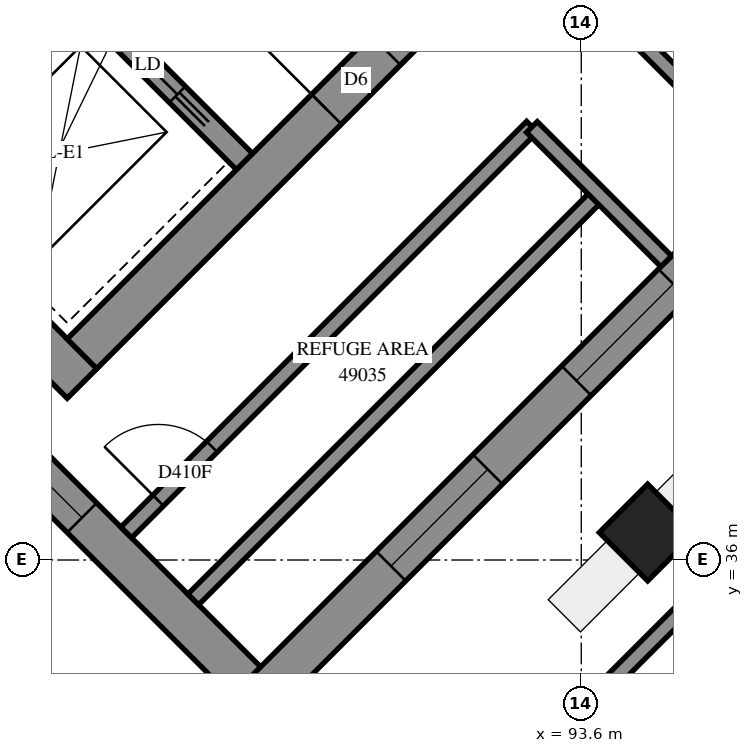
"""IFC4 building model, lengths in metres.
Left out: names, types, materials, properties, quantities, classifications, styles, units other than length and angle.
Written with IfcOpenShell. Run it as: python <this file> out.ifc"""

import sys

from ifc_helpers import new_model, si_unit, direction, frame, frame_2d, origin, origin_2d, place, context, subcontext, project, spatial, polyline, rectangle, outline, extrude, element, fill, save


model = new_model("IFC4")
c1 = context("Model", 3, precision=1e-05, world=origin(), true_north=direction((0.0, 1.0)))
c2 = subcontext(c1, "Body", "Model", "MODEL_VIEW")
j1 = project(units=[si_unit("LENGTHUNIT", "METRE"), si_unit("PLANEANGLEUNIT", "RADIAN")], contexts=[c1])
p1 = place(None, origin())
s1 = spatial("IfcSite", under=j1, at=p1, CompositionType="ELEMENT")
p2 = place(p1, origin())
s2 = spatial("IfcBuilding", under=s1, at=p2, CompositionType="ELEMENT")
p3 = place(p2, frame((0.0, 0.0, 180.4)))
s3 = spatial("IfcBuildingStorey", under=s2, at=p3, CompositionType="ELEMENT", Elevation=180.4)
p4 = place(p3, frame((94.474, 36.362, -0.3), z_axis=(0.0, 0.0, 1.0), x_axis=(0.7071067812, -0.7071067812, 0.0)))
e1 = element("IfcColumn", 1, at=p4, inside=s3, PredefinedType="COLUMN", context=c2, shape_type="SweptSolid", body=[
    extrude(rectangle(XDim=0.9, YDim=0.9, at=origin_2d()), origin(), (0.0, 0.0, 1.0), 5.0),
])
p5 = place(p3, frame((76.071, 49.284, -0.3), z_axis=(0.0, 0.0, 1.0), x_axis=(0.7071035554, -0.707110007, 0.0)))
e2 = element("IfcWall", 2, at=p5, inside=s3, PredefinedType="SHEAR", context=c2, shape_type="SweptSolid", body=[
    extrude(rectangle(XDim=15.5, YDim=0.55, at=frame_2d((7.75, 0.0))), origin(), (0.0, 0.0, 1.0), 4.3),
])
p6 = place(p3, frame((87.031, 38.713, -0.3), z_axis=(0.0, 0.0, 1.0), x_axis=(0.707103309, 0.7071102534, 0.0)))
e3 = element("IfcWall", 3, at=p6, inside=s3, PredefinedType="SHEAR", context=c2, shape_type="SweptSolid", body=[
    extrude(rectangle(XDim=14.4, YDim=0.55, at=frame_2d((7.2, 0.0))), origin(), (0.0, 0.0, 1.0), 4.3),
])
p7 = place(p6, frame((4.55, 0.0, 0.3)))
e4 = element("IfcOpeningElement", 4, at=p7, cuts=e3, PredefinedType="OPENING", context=c2, shape_type="SweptSolid", body=[
    extrude(rectangle(XDim=1.1, YDim=2.1, at=frame_2d((0.55, 1.05))), frame((0.0, 0.285, 0.0), z_axis=(0.0, -1.0, 0.0), x_axis=(1.0, 0.0, 0.0)), (0.0, 0.0, 1.0), 0.57),
])
p8 = place(p6, frame((11.35, 0.0, 0.3)))
e5 = element("IfcOpeningElement", 5, at=p8, cuts=e3, PredefinedType="OPENING", context=c2, shape_type="SweptSolid", body=[
    extrude(rectangle(XDim=1.1, YDim=2.1, at=frame_2d((0.55, 1.05))), frame((0.0, 0.285, 0.0), z_axis=(0.0, -1.0, 0.0), x_axis=(1.0, 0.0, 0.0)), (0.0, 0.0, 1.0), 0.57),
])
p9 = place(p3, frame((84.291, 41.453, 0.0), z_axis=(0.0, 0.0, 1.0), x_axis=(0.7071067812, 0.7071067812, 0.0)))
e6 = element("IfcWall", 6, at=p9, inside=s3, PredefinedType="SOLIDWALL", context=c2, shape_type="SweptSolid", body=[
    extrude(rectangle(XDim=3.3, YDim=0.3, at=frame_2d((1.65, 0.0))), origin(), (0.0, 0.0, 1.0), 4.7),
])
p10 = place(p3, frame((78.988, 51.423, 0.0), z_axis=(0.0, 0.0, 1.0), x_axis=(0.7071067812, -0.7071067812, 0.0)))
e7 = element("IfcWall", 7, at=p10, inside=s3, PredefinedType="SOLIDWALL", context=c2, shape_type="SweptSolid", body=[
    extrude(rectangle(XDim=14.4, YDim=0.3, at=frame_2d((7.2, 0.0))), origin(), (0.0, 0.0, 1.0), 4.7),
])
p11 = place(p10, frame((1.35, 0.0, 0.0)))
e8 = element("IfcOpeningElement", 8, at=p11, cuts=e7, PredefinedType="OPENING", context=c2, shape_type="SweptSolid", body=[
    extrude(rectangle(XDim=0.9, YDim=2.1, at=frame_2d((0.45, 1.05))), frame((0.0, 0.16, 0.0), z_axis=(0.0, -1.0, 0.0), x_axis=(1.0, 0.0, 0.0)), (0.0, 0.0, 1.0), 0.32),
])
p12 = place(p10, frame((4.95, 0.0, 0.0)))
e9 = element("IfcOpeningElement", 9, at=p12, cuts=e7, PredefinedType="OPENING", context=c2, shape_type="SweptSolid", body=[
    extrude(rectangle(XDim=0.9, YDim=2.1, at=frame_2d((0.45, 1.05))), frame((0.0, 0.16, 0.0), z_axis=(0.0, -1.0, 0.0), x_axis=(1.0, 0.0, 0.0)), (0.0, 0.0, 1.0), 0.32),
])
p13 = place(p10, frame((8.55, 0.0, 0.0)))
e10 = element("IfcOpeningElement", 10, at=p13, cuts=e7, PredefinedType="OPENING", context=c2, shape_type="SweptSolid", body=[
    extrude(rectangle(XDim=0.9, YDim=2.1, at=frame_2d((0.45, 1.05))), frame((0.0, 0.16, 0.0), z_axis=(0.0, -1.0, 0.0), x_axis=(1.0, 0.0, 0.0)), (0.0, 0.0, 1.0), 0.32),
])
p14 = place(p10, frame((12.05, 0.0, 0.0)))
e11 = element("IfcOpeningElement", 11, at=p14, cuts=e7, PredefinedType="OPENING", context=c2, shape_type="SweptSolid", body=[
    extrude(rectangle(XDim=1.1, YDim=2.1, at=frame_2d((0.55, 1.05))), frame((0.0, 0.16, 0.0), z_axis=(0.0, -1.0, 0.0), x_axis=(1.0, 0.0, 0.0)), (0.0, 0.0, 1.0), 0.32),
])
p15 = place(p3, frame((78.312, 45.275, 0.0), z_axis=(0.0, 0.0, 1.0), x_axis=(0.7071035873, -0.707109975, 0.0)))
e12 = element("IfcWall", 12, at=p15, inside=s3, PredefinedType="SOLIDWALL", context=c2, shape_type="SweptSolid", body=[
    extrude(outline(polyline([(0.114, -0.275), (15.93, -0.275), (15.38, 0.275), (-0.114, 0.275), (0.114, -0.275)])), origin(), (0.0, 0.0, 1.0), 4.7),
])
p16 = place(p15, frame((4.23, 0.0, 0.9)))
e13 = element("IfcOpeningElement", 13, at=p16, cuts=e12, PredefinedType="OPENING", context=c2, shape_type="SweptSolid", body=[
    extrude(rectangle(XDim=1.8, YDim=3.6, at=frame_2d((0.9, 1.8))), frame((0.0, 0.285, 0.0), z_axis=(0.0, -1.0, 0.0), x_axis=(1.0, 0.0, 0.0)), (0.0, 0.0, 1.0), 0.57),
])
p17 = place(p15, frame((7.83, 0.0, 0.9)))
e14 = element("IfcOpeningElement", 14, at=p17, cuts=e12, PredefinedType="OPENING", context=c2, shape_type="SweptSolid", body=[
    extrude(rectangle(XDim=1.8, YDim=3.6, at=frame_2d((0.9, 1.8))), frame((0.0, 0.285, 0.0), z_axis=(0.0, -1.0, 0.0), x_axis=(1.0, 0.0, 0.0)), (0.0, 0.0, 1.0), 0.57),
])
p18 = place(p15, frame((10.53, 0.0, 0.9)))
e15 = element("IfcOpeningElement", 15, at=p18, cuts=e12, PredefinedType="OPENING", context=c2, shape_type="SweptSolid", body=[
    extrude(rectangle(XDim=1.8, YDim=3.6, at=frame_2d((0.9, 1.8))), frame((0.0, 0.285, 0.0), z_axis=(0.0, -1.0, 0.0), x_axis=(1.0, 0.0, 0.0)), (0.0, 0.0, 1.0), 0.57),
])
p19 = place(p3, frame((89.382, 34.205, 0.0), z_axis=(0.0, 0.0, 1.0), x_axis=(0.7071067812, 0.7071067812, 0.0)))
e16 = element("IfcWall", 16, at=p19, inside=s3, PredefinedType="SOLIDWALL", context=c2, shape_type="SweptSolid", body=[
    extrude(outline(polyline([(-0.275, -0.275), (15.325, -0.275), (14.775, 0.275), (0.275, 0.275), (-0.275, -0.275)])), origin(), (0.0, 0.0, 1.0), 4.7),
])
p20 = place(p19, frame((2.425, 0.0, 0.9)))
e17 = element("IfcOpeningElement", 17, at=p20, cuts=e16, PredefinedType="OPENING", context=c2, shape_type="SweptSolid", body=[
    extrude(rectangle(XDim=1.8, YDim=3.6, at=frame_2d((0.9, 1.8))), frame((0.0, 0.285, 0.0), z_axis=(0.0, -1.0, 0.0), x_axis=(1.0, 0.0, 0.0)), (0.0, 0.0, 1.0), 0.57),
])
p21 = place(p19, frame((5.875, 0.0, 0.9)))
e18 = element("IfcOpeningElement", 18, at=p21, cuts=e16, PredefinedType="OPENING", context=c2, shape_type="SweptSolid", body=[
    extrude(rectangle(XDim=1.8, YDim=3.6, at=frame_2d((0.9, 1.8))), frame((0.0, 0.285, 0.0), z_axis=(0.0, -1.0, 0.0), x_axis=(1.0, 0.0, 0.0)), (0.0, 0.0, 1.0), 0.57),
])
p22 = place(p19, frame((9.775, 0.0, 0.9)))
e19 = element("IfcOpeningElement", 19, at=p22, cuts=e16, PredefinedType="OPENING", context=c2, shape_type="SweptSolid", body=[
    extrude(rectangle(XDim=1.8, YDim=3.6, at=frame_2d((0.9, 1.8))), frame((0.0, 0.285, 0.0), z_axis=(0.0, -1.0, 0.0), x_axis=(1.0, 0.0, 0.0)), (0.0, 0.0, 1.0), 0.57),
])
p23 = place(p3, frame((77.018, 42.15, 0.0), z_axis=(0.0, 0.0, 1.0), x_axis=(0.7071039217, -0.7071096407, 0.0)))
e20 = element("IfcWall", 20, at=p23, inside=s3, PredefinedType="SOLIDWALL", context=c2, shape_type="SweptSolid", body=[
    extrude(outline(polyline([(0.041, -0.1), (17.586, -0.1), (17.386, 0.1), (-0.041, 0.1), (0.041, -0.1)])), origin(), (0.0, 0.0, 1.0), 4.7),
])
p24 = place(p3, frame((89.382, 29.786, 0.0), z_axis=(0.0, 0.0, 1.0), x_axis=(0.7071094267, 0.7071041357, 0.0)))
e21 = element("IfcWall", 21, at=p24, inside=s3, PredefinedType="SOLIDWALL", context=c2, shape_type="SweptSolid", body=[
    extrude(outline(polyline([(-0.1, -0.1), (19.0, -0.1), (18.8, 0.1), (0.1, 0.1), (-0.1, -0.1)])), origin(), (0.0, 0.0, 1.0), 4.7),
])
p25 = place(p3, frame((88.495, 35.481, 0.0), z_axis=(0.0, 0.0, 1.0), x_axis=(0.7072325932, 0.7069809467, 0.0)))
e22 = element("IfcWall", 22, at=p25, inside=s3, PredefinedType="PARTITIONING", context=c2, shape_type="SweptSolid", body=[
    extrude(rectangle(XDim=7.55, YDim=0.2, at=frame_2d((3.775, 0.0))), origin(), (0.0, 0.0, 1.0), 4.7),
])
p26 = place(p3, frame((87.614, 36.363, 0.0), z_axis=(0.0, 0.0, 1.0), x_axis=(0.7071001576, 0.7071134047, 0.0)))
e23 = element("IfcWall", 23, at=p26, inside=s3, PredefinedType="PARTITIONING", context=c2, shape_type="SweptSolid", body=[
    extrude(rectangle(XDim=7.549, YDim=0.2, at=frame_2d((3.774, 0.0))), origin(), (0.0, 0.0, 1.0), 4.7),
])
p27 = place(p26, frame((0.595, 0.0, 0.0)))
e24 = element("IfcOpeningElement", 24, at=p27, cuts=e23, PredefinedType="OPENING", context=c2, shape_type="SweptSolid", body=[
    extrude(rectangle(XDim=1.0, YDim=2.1, at=frame_2d((0.5, 1.05))), frame((0.0, 0.11, 0.0), z_axis=(0.0, -1.0, 0.0), x_axis=(1.0, 0.0, 0.0)), (0.0, 0.0, 1.0), 0.22),
])
p28 = place(p3, frame((92.951, 41.697, 0.0), z_axis=(0.0, 0.0, 1.0), x_axis=(0.7071267879, -0.7070867739, 0.0)))
e25 = element("IfcWall", 25, at=p28, inside=s3, PredefinedType="PARTITIONING", context=c2, shape_type="SweptSolid", body=[
    extrude(rectangle(XDim=2.499, YDim=0.2, at=frame_2d((1.25, 0.0))), origin(), (0.0, 0.0, 1.0), 4.7),
])
p29 = place(p3, frame((94.371, 42.836, 0.0), z_axis=(0.0, 0.0, 1.0), x_axis=(0.7071067812, -0.7071067812, 0.0)))
e26 = element("IfcWall", 26, at=p29, inside=s3, PredefinedType="PARTITIONING", context=c2, shape_type="SweptSolid", body=[
    extrude(rectangle(XDim=2.3, YDim=0.2, at=frame_2d((1.15, 0.0))), origin(), (0.0, 0.0, 1.0), 4.7),
])
p30 = place(p18, origin())
e27 = element("IfcWindow", 27, at=p30, inside=s3, PartitioningType="SINGLE_PANEL", PredefinedType="WINDOW", context=c2, shape_type="SweptSolid", body=[
    extrude(rectangle(XDim=1.8, YDim=3.6, at=frame_2d((0.9, 1.8))), frame((0.0, 0.155, 0.0), z_axis=(0.0, -1.0, 0.0), x_axis=(1.0, 0.0, 0.0)), (0.0, 0.0, 1.0), 0.06),
])
fill(e15, e27)
p31 = place(p20, origin())
e28 = element("IfcWindow", 28, at=p31, inside=s3, PartitioningType="SINGLE_PANEL", PredefinedType="WINDOW", context=c2, shape_type="SweptSolid", body=[
    extrude(rectangle(XDim=1.8, YDim=3.6, at=frame_2d((0.9, 1.8))), frame((0.0, 0.155, 0.0), z_axis=(0.0, -1.0, 0.0), x_axis=(1.0, 0.0, 0.0)), (0.0, 0.0, 1.0), 0.06),
])
fill(e17, e28)
p32 = place(p21, origin())
e29 = element("IfcWindow", 29, at=p32, inside=s3, PartitioningType="SINGLE_PANEL", PredefinedType="WINDOW", context=c2, shape_type="SweptSolid", body=[
    extrude(rectangle(XDim=1.8, YDim=3.6, at=frame_2d((0.9, 1.8))), frame((0.0, 0.155, 0.0), z_axis=(0.0, -1.0, 0.0), x_axis=(1.0, 0.0, 0.0)), (0.0, 0.0, 1.0), 0.06),
])
fill(e18, e29)
p33 = place(p7, origin())
e30 = element("IfcDoor", 30, at=p33, inside=s3, OperationType="DOUBLE_DOOR_SINGLE_SWING", PredefinedType="DOOR", context=c2, shape_type="SweptSolid", body=[
    extrude(rectangle(XDim=1.1, YDim=2.1, at=frame_2d((0.55, 1.05))), frame((0.0, 0.025, 0.0), z_axis=(0.0, -1.0, 0.0), x_axis=(1.0, 0.0, 0.0)), (0.0, 0.0, 1.0), 0.05),
])
fill(e4, e30)
p34 = place(p14, origin())
e31 = element("IfcDoor", 31, at=p34, inside=s3, OperationType="SLIDING_TO_RIGHT", PredefinedType="DOOR", context=c2, shape_type="SweptSolid", body=[
    extrude(rectangle(XDim=1.1, YDim=2.1, at=frame_2d((0.55, 1.05))), frame((0.0, 0.025, 0.0), z_axis=(0.0, -1.0, 0.0), x_axis=(1.0, 0.0, 0.0)), (0.0, 0.0, 1.0), 0.05),
])
fill(e11, e31)
p35 = place(p27, origin())
e32 = element("IfcDoor", 32, at=p35, inside=s3, OperationType="SINGLE_SWING_LEFT", PredefinedType="DOOR", context=c2, shape_type="SweptSolid", body=[
    extrude(rectangle(XDim=1.0, YDim=2.1, at=frame_2d((0.5, 1.05))), frame((0.0, 0.025, 0.0), z_axis=(0.0, -1.0, 0.0), x_axis=(1.0, 0.0, 0.0)), (0.0, 0.0, 1.0), 0.05),
])
fill(e24, e32)
save(model, sys.argv[1])
